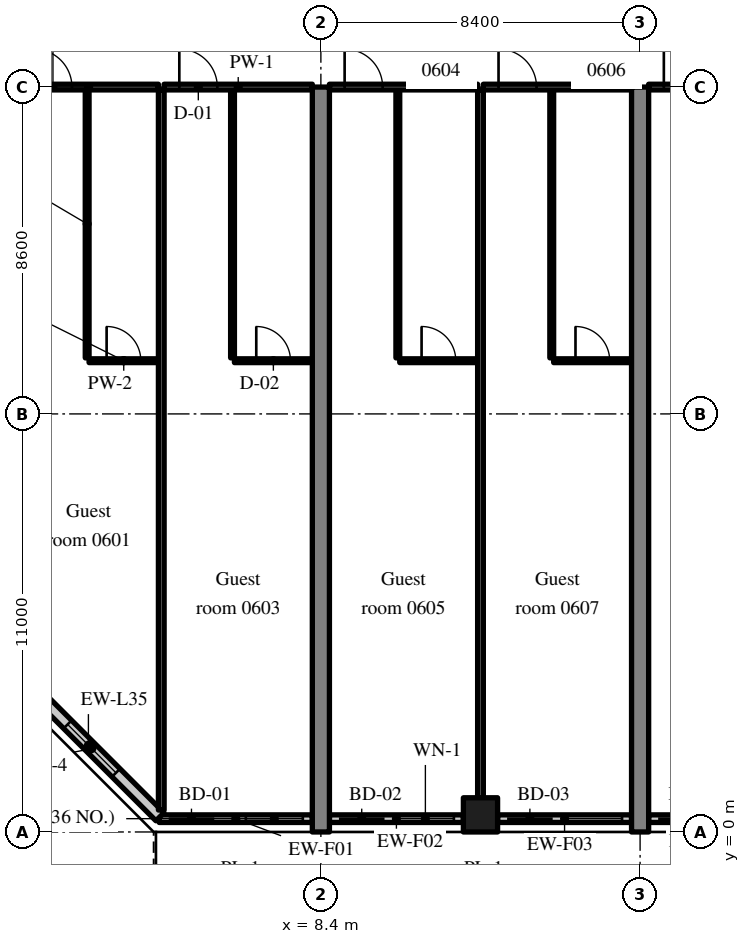
"""IFC4 building model, lengths in metres.
Left out: names, types, materials, properties, quantities, classifications, styles, units other than length and angle.
Written with IfcOpenShell. Run it as: python <this file> out.ifc"""

import sys

from ifc_helpers import new_model, si_unit, direction, frame, frame_2d, origin, origin_2d, place, context, subcontext, project, spatial, rectangle, extrude, source, transform, mapped, element, fill, save


model = new_model("IFC4")
c1 = context("Model", 3, precision=1e-05, world=origin(), true_north=direction((0.0, 1.0)))
c2 = subcontext(c1, "Body", "Model", "MODEL_VIEW")
j1 = project(units=[si_unit("LENGTHUNIT", "METRE"), si_unit("PLANEANGLEUNIT", "RADIAN")], contexts=[c1])
p1 = place(None, origin())
s1 = spatial("IfcSite", under=j1, at=p1, CompositionType="ELEMENT")
p2 = place(p1, origin())
s2 = spatial("IfcBuilding", under=s1, at=p2, CompositionType="ELEMENT")
p3 = place(p2, frame((0.0, 0.0, 31.6)))
s3 = spatial("IfcBuildingStorey", under=s2, at=p3, CompositionType="ELEMENT", Elevation=31.6)
m1 = source(origin(), c2, "Body", "SweptSolid", [
    extrude(rectangle(XDim=19.6, YDim=0.45, at=frame_2d((9.8, 0.0))), origin(), (0.0, 0.0, 1.0), 3.52),
])
for number, where, z_axis, x_axis in (
    (1, (8.4, 0.0, 0.0), (0.0, 0.0, 1.0), (0.0, 1.0, 0.0)),
    (2, (16.8, 0.0, 0.0), (0.0, 0.0, 1.0), (0.0, 1.0, 0.0)),
):
    element("IfcWall", number, at=place(p3, frame(where, z_axis=z_axis, x_axis=x_axis)), inside=s3, PredefinedType="SHEAR", context=c2, shape_type="MappedRepresentation", body=[
        mapped(m1, transform((0.0, 0.0, 0.0), scale=1.0)),
    ])
m2 = source(origin(), c2, "Body", "SweptSolid", [
    extrude(rectangle(XDim=0.9, YDim=0.9, at=origin_2d()), origin(), (0.0, 0.0, 1.0), 3.52),
])
p4 = place(p3, frame((12.6, 0.45, 0.0), z_axis=(0.0, 0.0, 1.0), x_axis=(1.0, 0.0, 0.0)))
e3 = element("IfcColumn", 3, at=p4, inside=s3, PredefinedType="COLUMN", context=c2, shape_type="MappedRepresentation", body=[
    mapped(m2, transform((0.0, 0.0, 0.0), scale=1.0)),
])
m3 = source(origin(), c2, "Body", "SweptSolid", [
    extrude(rectangle(XDim=4.03, YDim=0.2, at=frame_2d((2.015, 0.0))), origin(), (0.0, 0.0, 1.0), 2.77),
])
p5 = place(p3, frame((4.145, 0.35, 0.0), z_axis=(0.0, 0.0, 1.0), x_axis=(1.0, 0.0, 0.0)))
e4 = element("IfcWall", 4, at=p5, inside=s3, PredefinedType="SOLIDWALL", context=c2, shape_type="MappedRepresentation", body=[
    mapped(m3, transform((0.0, 0.0, 0.0), scale=1.0)),
])
m4 = source(origin(), c2, "Body", "SweptSolid", [
    extrude(rectangle(XDim=1.2, YDim=2.4, at=frame_2d((0.6, 1.2))), frame((0.0, 0.11, 0.0), z_axis=(0.0, -1.0, 0.0), x_axis=(1.0, 0.0, 0.0)), (0.0, 0.0, 1.0), 0.22),
])
p6 = place(p5, frame((0.25, 0.0, 0.0)))
e5 = element("IfcOpeningElement", 5, at=p6, cuts=e4, PredefinedType="OPENING", context=c2, shape_type="MappedRepresentation", body=[
    mapped(m4, transform((0.0, 0.0, 0.0), scale=1.0)),
])
m5 = source(origin(), c2, "Body", "SweptSolid", [
    extrude(rectangle(XDim=1.5, YDim=1.5, at=frame_2d((0.75, 0.75))), frame((0.0, 0.11, 0.0), z_axis=(0.0, -1.0, 0.0), x_axis=(1.0, 0.0, 0.0)), (0.0, 0.0, 1.0), 0.22),
])
p7 = place(p5, frame((2.28, 0.0, 0.9)))
e6 = element("IfcOpeningElement", 6, at=p7, cuts=e4, PredefinedType="OPENING", context=c2, shape_type="MappedRepresentation", body=[
    mapped(m5, transform((0.0, 0.0, 0.0), scale=1.0)),
])
m6 = source(origin(), c2, "Body", "SweptSolid", [
    extrude(rectangle(XDim=3.525, YDim=0.2, at=frame_2d((1.762, 0.0))), origin(), (0.0, 0.0, 1.0), 2.77),
])
p8 = place(p3, frame((8.625, 0.35, 0.0), z_axis=(0.0, 0.0, 1.0), x_axis=(1.0, 0.0, 0.0)))
e7 = element("IfcWall", 7, at=p8, inside=s3, PredefinedType="SOLIDWALL", context=c2, shape_type="MappedRepresentation", body=[
    mapped(m6, transform((0.0, 0.0, 0.0), scale=1.0)),
])
p9 = place(p8, frame((0.25, 0.0, 0.0)))
e8 = element("IfcOpeningElement", 8, at=p9, cuts=e7, PredefinedType="OPENING", context=c2, shape_type="MappedRepresentation", body=[
    mapped(m4, transform((0.0, 0.0, 0.0), scale=1.0)),
])
p10 = place(p8, frame((1.775, 0.0, 0.9)))
e9 = element("IfcOpeningElement", 9, at=p10, cuts=e7, PredefinedType="OPENING", context=c2, shape_type="MappedRepresentation", body=[
    mapped(m5, transform((0.0, 0.0, 0.0), scale=1.0)),
])
p11 = place(p3, frame((13.05, 0.35, 0.0), z_axis=(0.0, 0.0, 1.0), x_axis=(1.0, 0.0, 0.0)))
e10 = element("IfcWall", 10, at=p11, inside=s3, PredefinedType="SOLIDWALL", context=c2, shape_type="MappedRepresentation", body=[
    mapped(m6, transform((0.0, 0.0, 0.0), scale=1.0)),
])
p12 = place(p11, frame((0.25, 0.0, 0.0)))
e11 = element("IfcOpeningElement", 11, at=p12, cuts=e10, PredefinedType="OPENING", context=c2, shape_type="MappedRepresentation", body=[
    mapped(m4, transform((0.0, 0.0, 0.0), scale=1.0)),
])
p13 = place(p11, frame((1.775, 0.0, 0.9)))
e12 = element("IfcOpeningElement", 12, at=p13, cuts=e10, PredefinedType="OPENING", context=c2, shape_type="MappedRepresentation", body=[
    mapped(m5, transform((0.0, 0.0, 0.0), scale=1.0)),
])
m7 = source(origin(), c2, "Body", "SweptSolid", [
    extrude(rectangle(XDim=3.525, YDim=0.2, at=frame_2d((1.763, 0.0))), origin(), (0.0, 0.0, 1.0), 2.77),
])
p14 = place(p3, frame((17.025, 0.35, 0.0), z_axis=(0.0, 0.0, 1.0), x_axis=(1.0, 0.0, 0.0)))
e13 = element("IfcWall", 13, at=p14, inside=s3, PredefinedType="SOLIDWALL", context=c2, shape_type="MappedRepresentation", body=[
    mapped(m7, transform((0.0, 0.0, 0.0), scale=1.0)),
])
p15 = place(p14, frame((0.25, 0.0, 0.0)))
e14 = element("IfcOpeningElement", 14, at=p15, cuts=e13, PredefinedType="OPENING", context=c2, shape_type="MappedRepresentation", body=[
    mapped(m4, transform((0.0, 0.0, 0.0), scale=1.0)),
])
p16 = place(p14, frame((1.775, 0.0, 0.9)))
e15 = element("IfcOpeningElement", 15, at=p16, cuts=e13, PredefinedType="OPENING", context=c2, shape_type="MappedRepresentation", body=[
    mapped(m5, transform((0.0, 0.0, 0.0), scale=1.0)),
])
m8 = source(origin(), c2, "Body", "SweptSolid", [
    extrude(rectangle(XDim=5.326, YDim=0.3, at=frame_2d((2.663, 0.0))), origin(), (0.0, 0.0, 1.0), 3.52),
])
p17 = place(p3, frame((0.4, 4.166, 0.0), z_axis=(0.0, 0.0, 1.0), x_axis=(0.707106781187, -0.707106781187, 0.0)))
e16 = element("IfcWall", 16, at=p17, inside=s3, PredefinedType="SOLIDWALL", context=c2, shape_type="MappedRepresentation", body=[
    mapped(m8, transform((0.0, 0.0, 0.0), scale=1.0)),
])
m9 = source(origin(), c2, "Body", "SweptSolid", [
    extrude(rectangle(XDim=1.8, YDim=1.5, at=frame_2d((0.9, 0.75))), frame((0.0, 0.16, 0.0), z_axis=(0.0, -1.0, 0.0), x_axis=(1.0, 0.0, 0.0)), (0.0, 0.0, 1.0), 0.32),
])
p18 = place(p17, frame((1.889, 0.0, 0.9)))
e17 = element("IfcOpeningElement", 17, at=p18, cuts=e16, PredefinedType="OPENING", context=c2, shape_type="MappedRepresentation", body=[
    mapped(m9, transform((0.0, 0.0, 0.0), scale=1.0)),
])
m10 = source(origin(), c2, "Body", "SweptSolid", [
    extrude(rectangle(XDim=7.05, YDim=0.1, at=frame_2d((3.525, 0.0))), origin(), (0.0, 0.0, 1.0), 3.52),
])
p19 = place(p3, frame((2.25, 12.475, 0.0), z_axis=(0.0, 0.0, 1.0), x_axis=(0.0, 1.0, 0.0)))
e18 = element("IfcWall", 18, at=p19, inside=s3, PredefinedType="PARTITIONING", context=c2, shape_type="MappedRepresentation", body=[
    mapped(m10, transform((0.0, 0.0, 0.0), scale=1.0)),
])
m11 = source(origin(), c2, "Body", "SweptSolid", [
    extrude(rectangle(XDim=1.825, YDim=0.1, at=frame_2d((0.913, 0.0))), origin(), (0.0, 0.0, 1.0), 3.52),
])
p20 = place(p3, frame((2.3, 12.4, 0.0), z_axis=(0.0, 0.0, 1.0), x_axis=(1.0, 0.0, 0.0)))
e19 = element("IfcWall", 19, at=p20, inside=s3, PredefinedType="PARTITIONING", context=c2, shape_type="MappedRepresentation", body=[
    mapped(m11, transform((0.0, 0.0, 0.0), scale=1.0)),
])
m12 = source(origin(), c2, "Body", "SweptSolid", [
    extrude(rectangle(XDim=0.9, YDim=2.1, at=frame_2d((0.45, 1.05))), frame((0.0, 0.06, 0.0), z_axis=(0.0, -1.0, 0.0), x_axis=(1.0, 0.0, 0.0)), (0.0, 0.0, 1.0), 0.12),
])
p21 = place(p20, frame((0.462, 0.0, 0.0)))
e20 = element("IfcOpeningElement", 20, at=p21, cuts=e19, PredefinedType="OPENING", context=c2, shape_type="MappedRepresentation", body=[
    mapped(m12, transform((0.0, 0.0, 0.0), scale=1.0)),
])
m13 = source(origin(), c2, "Body", "SweptSolid", [
    extrude(rectangle(XDim=3.675, YDim=0.15, at=frame_2d((1.837, 0.0))), origin(), (0.0, 0.0, 1.0), 2.82),
])
p22 = place(p3, frame((0.45, 19.6, 0.0), z_axis=(0.0, 0.0, 1.0), x_axis=(1.0, 0.0, 0.0)))
e21 = element("IfcWall", 21, at=p22, inside=s3, PredefinedType="PARTITIONING", context=c2, shape_type="MappedRepresentation", body=[
    mapped(m13, transform((0.0, 0.0, 0.0), scale=1.0)),
])
m14 = source(origin(), c2, "Body", "SweptSolid", [
    extrude(rectangle(XDim=1.0, YDim=2.1, at=frame_2d((0.5, 1.05))), frame((0.0, 0.085, 0.0), z_axis=(0.0, -1.0, 0.0), x_axis=(1.0, 0.0, 0.0)), (0.0, 0.0, 1.0), 0.17),
])
p23 = place(p22, frame((0.4, 0.0, 0.0)))
e22 = element("IfcOpeningElement", 22, at=p23, cuts=e21, PredefinedType="OPENING", context=c2, shape_type="MappedRepresentation", body=[
    mapped(m14, transform((0.0, 0.0, 0.0), scale=1.0)),
])
p24 = place(p3, frame((6.075, 12.475, 0.0), z_axis=(0.0, 0.0, 1.0), x_axis=(0.0, 1.0, 0.0)))
e23 = element("IfcWall", 23, at=p24, inside=s3, PredefinedType="PARTITIONING", context=c2, shape_type="MappedRepresentation", body=[
    mapped(m10, transform((0.0, 0.0, 0.0), scale=1.0)),
])
m15 = source(origin(), c2, "Body", "SweptSolid", [
    extrude(rectangle(XDim=2.05, YDim=0.1, at=frame_2d((1.025, 0.0))), origin(), (0.0, 0.0, 1.0), 3.52),
])
p25 = place(p3, frame((6.125, 12.4, 0.0), z_axis=(0.0, 0.0, 1.0), x_axis=(1.0, 0.0, 0.0)))
e24 = element("IfcWall", 24, at=p25, inside=s3, PredefinedType="PARTITIONING", context=c2, shape_type="MappedRepresentation", body=[
    mapped(m15, transform((0.0, 0.0, 0.0), scale=1.0)),
])
p26 = place(p25, frame((0.575, 0.0, 0.0)))
e25 = element("IfcOpeningElement", 25, at=p26, cuts=e24, PredefinedType="OPENING", context=c2, shape_type="MappedRepresentation", body=[
    mapped(m12, transform((0.0, 0.0, 0.0), scale=1.0)),
])
m16 = source(origin(), c2, "Body", "SweptSolid", [
    extrude(rectangle(XDim=3.9, YDim=0.15, at=frame_2d((1.95, 0.0))), origin(), (0.0, 0.0, 1.0), 2.82),
])
p27 = place(p3, frame((4.275, 19.6, 0.0), z_axis=(0.0, 0.0, 1.0), x_axis=(1.0, 0.0, 0.0)))
e26 = element("IfcWall", 26, at=p27, inside=s3, PredefinedType="PARTITIONING", context=c2, shape_type="MappedRepresentation", body=[
    mapped(m16, transform((0.0, 0.0, 0.0), scale=1.0)),
])
p28 = place(p27, frame((0.4, 0.0, 0.0)))
e27 = element("IfcOpeningElement", 27, at=p28, cuts=e26, PredefinedType="OPENING", context=c2, shape_type="MappedRepresentation", body=[
    mapped(m14, transform((0.0, 0.0, 0.0), scale=1.0)),
])
m17 = source(origin(), c2, "Body", "SweptSolid", [
    extrude(rectangle(XDim=18.947, YDim=0.15, at=frame_2d((9.474, 0.0))), origin(), (0.0, 0.0, 1.0), 3.52),
])
p29 = place(p3, frame((4.2, 0.578, 0.0), z_axis=(0.0, 0.0, 1.0), x_axis=(0.0, 1.0, 0.0)))
e28 = element("IfcWall", 28, at=p29, inside=s3, PredefinedType="PARTITIONING", context=c2, shape_type="MappedRepresentation", body=[
    mapped(m17, transform((0.0, 0.0, 0.0), scale=1.0)),
])
p30 = place(p3, frame((10.425, 12.475, 0.0), z_axis=(0.0, 0.0, 1.0), x_axis=(0.0, 1.0, 0.0)))
e29 = element("IfcWall", 29, at=p30, inside=s3, PredefinedType="PARTITIONING", context=c2, shape_type="MappedRepresentation", body=[
    mapped(m10, transform((0.0, 0.0, 0.0), scale=1.0)),
])
m18 = source(origin(), c2, "Body", "SweptSolid", [
    extrude(rectangle(XDim=2.05, YDim=0.1, at=frame_2d((1.025, 0.0))), origin(), (0.0, 0.0, 1.0), 3.52),
])
p31 = place(p3, frame((10.475, 12.4, 0.0), z_axis=(0.0, 0.0, 1.0), x_axis=(1.0, 0.0, 0.0)))
e30 = element("IfcWall", 30, at=p31, inside=s3, PredefinedType="PARTITIONING", context=c2, shape_type="MappedRepresentation", body=[
    mapped(m18, transform((0.0, 0.0, 0.0), scale=1.0)),
])
p32 = place(p31, frame((0.575, 0.0, 0.0)))
e31 = element("IfcOpeningElement", 31, at=p32, cuts=e30, PredefinedType="OPENING", context=c2, shape_type="MappedRepresentation", body=[
    mapped(m12, transform((0.0, 0.0, 0.0), scale=1.0)),
])
m19 = source(origin(), c2, "Body", "SweptSolid", [
    extrude(rectangle(XDim=3.9, YDim=0.15, at=frame_2d((1.95, 0.0))), origin(), (0.0, 0.0, 1.0), 2.82),
])
p33 = place(p3, frame((8.625, 19.6, 0.0), z_axis=(0.0, 0.0, 1.0), x_axis=(1.0, 0.0, 0.0)))
e32 = element("IfcWall", 32, at=p33, inside=s3, PredefinedType="PARTITIONING", context=c2, shape_type="MappedRepresentation", body=[
    mapped(m19, transform((0.0, 0.0, 0.0), scale=1.0)),
])
p34 = place(p33, frame((0.4, 0.0, 0.0)))
e33 = element("IfcOpeningElement", 33, at=p34, cuts=e32, PredefinedType="OPENING", context=c2, shape_type="MappedRepresentation", body=[
    mapped(m14, transform((0.0, 0.0, 0.0), scale=1.0)),
])
p35 = place(p3, frame((14.475, 12.475, 0.0), z_axis=(0.0, 0.0, 1.0), x_axis=(0.0, 1.0, 0.0)))
e34 = element("IfcWall", 34, at=p35, inside=s3, PredefinedType="PARTITIONING", context=c2, shape_type="MappedRepresentation", body=[
    mapped(m10, transform((0.0, 0.0, 0.0), scale=1.0)),
])
p36 = place(p3, frame((14.525, 12.4, 0.0), z_axis=(0.0, 0.0, 1.0), x_axis=(1.0, 0.0, 0.0)))
e35 = element("IfcWall", 35, at=p36, inside=s3, PredefinedType="PARTITIONING", context=c2, shape_type="MappedRepresentation", body=[
    mapped(m15, transform((0.0, 0.0, 0.0), scale=1.0)),
])
p37 = place(p36, frame((0.575, 0.0, 0.0)))
e36 = element("IfcOpeningElement", 36, at=p37, cuts=e35, PredefinedType="OPENING", context=c2, shape_type="MappedRepresentation", body=[
    mapped(m12, transform((0.0, 0.0, 0.0), scale=1.0)),
])
p38 = place(p3, frame((12.675, 19.6, 0.0), z_axis=(0.0, 0.0, 1.0), x_axis=(1.0, 0.0, 0.0)))
e37 = element("IfcWall", 37, at=p38, inside=s3, PredefinedType="PARTITIONING", context=c2, shape_type="MappedRepresentation", body=[
    mapped(m19, transform((0.0, 0.0, 0.0), scale=1.0)),
])
p39 = place(p38, frame((0.4, 0.0, 0.0)))
e38 = element("IfcOpeningElement", 38, at=p39, cuts=e37, PredefinedType="OPENING", context=c2, shape_type="MappedRepresentation", body=[
    mapped(m14, transform((0.0, 0.0, 0.0), scale=1.0)),
])
m20 = source(origin(), c2, "Body", "SweptSolid", [
    extrude(rectangle(XDim=18.625, YDim=0.15, at=frame_2d((9.312, 0.0))), origin(), (0.0, 0.0, 1.0), 3.52),
])
p40 = place(p3, frame((12.6, 0.9, 0.0), z_axis=(0.0, 0.0, 1.0), x_axis=(0.0, 1.0, 0.0)))
e39 = element("IfcWall", 39, at=p40, inside=s3, PredefinedType="PARTITIONING", context=c2, shape_type="MappedRepresentation", body=[
    mapped(m20, transform((0.0, 0.0, 0.0), scale=1.0)),
])
p41 = place(p3, frame((17.025, 19.6, 0.0), z_axis=(0.0, 0.0, 1.0), x_axis=(1.0, 0.0, 0.0)))
e40 = element("IfcWall", 40, at=p41, inside=s3, PredefinedType="PARTITIONING", context=c2, shape_type="MappedRepresentation", body=[
    mapped(m16, transform((0.0, 0.0, 0.0), scale=1.0)),
])
p42 = place(p41, frame((0.4, 0.0, 0.0)))
e41 = element("IfcOpeningElement", 41, at=p42, cuts=e40, PredefinedType="OPENING", context=c2, shape_type="MappedRepresentation", body=[
    mapped(m14, transform((0.0, 0.0, 0.0), scale=1.0)),
])
m21 = source(origin(), c2, "Body", "SweptSolid", [
    extrude(rectangle(XDim=1.2, YDim=2.4, at=frame_2d((0.6, 1.2))), frame((0.0, 0.025, 0.0), z_axis=(0.0, -1.0, 0.0), x_axis=(1.0, 0.0, 0.0)), (0.0, 0.0, 1.0), 0.05),
])
p43 = place(p6, origin())
e42 = element("IfcDoor", 42, at=p43, inside=s3, OperationType="SLIDING_TO_LEFT", PredefinedType="DOOR", context=c2, shape_type="MappedRepresentation", body=[
    mapped(m21, transform((0.0, 0.0, 0.0), scale=1.0)),
])
fill(e5, e42)
m22 = source(origin(), c2, "Body", "SweptSolid", [
    extrude(rectangle(XDim=1.5, YDim=1.5, at=frame_2d((0.75, 0.75))), frame((0.0, 0.03, 0.0), z_axis=(0.0, -1.0, 0.0), x_axis=(1.0, 0.0, 0.0)), (0.0, 0.0, 1.0), 0.06),
])
p44 = place(p7, origin())
e43 = element("IfcWindow", 43, at=p44, inside=s3, PartitioningType="SINGLE_PANEL", PredefinedType="WINDOW", context=c2, shape_type="MappedRepresentation", body=[
    mapped(m22, transform((0.0, 0.0, 0.0), scale=1.0)),
])
fill(e6, e43)
p45 = place(p9, origin())
e44 = element("IfcDoor", 44, at=p45, inside=s3, OperationType="SLIDING_TO_RIGHT", PredefinedType="DOOR", context=c2, shape_type="MappedRepresentation", body=[
    mapped(m21, transform((0.0, 0.0, 0.0), scale=1.0)),
])
fill(e8, e44)
p46 = place(p10, origin())
e45 = element("IfcWindow", 45, at=p46, inside=s3, PartitioningType="SINGLE_PANEL", PredefinedType="WINDOW", context=c2, shape_type="MappedRepresentation", body=[
    mapped(m22, transform((0.0, 0.0, 0.0), scale=1.0)),
])
fill(e9, e45)
p47 = place(p12, origin())
e46 = element("IfcDoor", 46, at=p47, inside=s3, OperationType="SLIDING_TO_LEFT", PredefinedType="DOOR", context=c2, shape_type="MappedRepresentation", body=[
    mapped(m21, transform((0.0, 0.0, 0.0), scale=1.0)),
])
fill(e11, e46)
p48 = place(p13, origin())
e47 = element("IfcWindow", 47, at=p48, inside=s3, PartitioningType="SINGLE_PANEL", PredefinedType="WINDOW", context=c2, shape_type="MappedRepresentation", body=[
    mapped(m22, transform((0.0, 0.0, 0.0), scale=1.0)),
])
fill(e12, e47)
p49 = place(p15, origin())
e48 = element("IfcDoor", 48, at=p49, inside=s3, OperationType="SLIDING_TO_RIGHT", PredefinedType="DOOR", context=c2, shape_type="MappedRepresentation", body=[
    mapped(m21, transform((0.0, 0.0, 0.0), scale=1.0)),
])
fill(e14, e48)
m23 = source(origin(), c2, "Body", "SweptSolid", [
    extrude(rectangle(XDim=1.8, YDim=1.5, at=frame_2d((0.9, 0.75))), frame((0.0, 0.03, 0.0), z_axis=(0.0, -1.0, 0.0), x_axis=(1.0, 0.0, 0.0)), (0.0, 0.0, 1.0), 0.06),
])
p50 = place(p18, origin())
e49 = element("IfcWindow", 49, at=p50, inside=s3, PartitioningType="SINGLE_PANEL", PredefinedType="WINDOW", context=c2, shape_type="MappedRepresentation", body=[
    mapped(m23, transform((0.0, 0.0, 0.0), scale=1.0)),
])
fill(e17, e49)
m24 = source(origin(), c2, "Body", "SweptSolid", [
    extrude(rectangle(XDim=0.9, YDim=2.1, at=frame_2d((0.45, 1.05))), frame((0.0, 0.025, 0.0), z_axis=(0.0, -1.0, 0.0), x_axis=(1.0, 0.0, 0.0)), (0.0, 0.0, 1.0), 0.05),
])
p51 = place(p21, origin())
e50 = element("IfcDoor", 50, at=p51, inside=s3, OperationType="SINGLE_SWING_LEFT", PredefinedType="DOOR", context=c2, shape_type="MappedRepresentation", body=[
    mapped(m24, transform((0.0, 0.0, 0.0), scale=1.0)),
])
fill(e20, e50)
m25 = source(origin(), c2, "Body", "SweptSolid", [
    extrude(rectangle(XDim=1.0, YDim=2.1, at=frame_2d((0.5, 1.05))), frame((0.0, 0.025, 0.0), z_axis=(0.0, -1.0, 0.0), x_axis=(1.0, 0.0, 0.0)), (0.0, 0.0, 1.0), 0.05),
])
p52 = place(p23, origin())
e51 = element("IfcDoor", 51, at=p52, inside=s3, OperationType="SINGLE_SWING_LEFT", PredefinedType="DOOR", context=c2, shape_type="MappedRepresentation", body=[
    mapped(m25, transform((0.0, 0.0, 0.0), scale=1.0)),
])
fill(e22, e51)
p53 = place(p26, origin())
e52 = element("IfcDoor", 52, at=p53, inside=s3, OperationType="SINGLE_SWING_LEFT", PredefinedType="DOOR", context=c2, shape_type="MappedRepresentation", body=[
    mapped(m24, transform((0.0, 0.0, 0.0), scale=1.0)),
])
fill(e25, e52)
p54 = place(p28, origin())
e53 = element("IfcDoor", 53, at=p54, inside=s3, OperationType="SINGLE_SWING_LEFT", PredefinedType="DOOR", context=c2, shape_type="MappedRepresentation", body=[
    mapped(m25, transform((0.0, 0.0, 0.0), scale=1.0)),
])
fill(e27, e53)
p55 = place(p32, origin())
e54 = element("IfcDoor", 54, at=p55, inside=s3, OperationType="SINGLE_SWING_LEFT", PredefinedType="DOOR", context=c2, shape_type="MappedRepresentation", body=[
    mapped(m24, transform((0.0, 0.0, 0.0), scale=1.0)),
])
fill(e31, e54)
p56 = place(p34, origin())
e55 = element("IfcDoor", 55, at=p56, inside=s3, OperationType="SINGLE_SWING_LEFT", PredefinedType="DOOR", context=c2, shape_type="MappedRepresentation", body=[
    mapped(m25, transform((0.0, 0.0, 0.0), scale=1.0)),
])
fill(e33, e55)
p57 = place(p37, origin())
e56 = element("IfcDoor", 56, at=p57, inside=s3, OperationType="SINGLE_SWING_LEFT", PredefinedType="DOOR", context=c2, shape_type="MappedRepresentation", body=[
    mapped(m24, transform((0.0, 0.0, 0.0), scale=1.0)),
])
fill(e36, e56)
p58 = place(p39, origin())
e57 = element("IfcDoor", 57, at=p58, inside=s3, OperationType="SINGLE_SWING_LEFT", PredefinedType="DOOR", context=c2, shape_type="MappedRepresentation", body=[
    mapped(m25, transform((0.0, 0.0, 0.0), scale=1.0)),
])
fill(e38, e57)
p59 = place(p42, origin())
e58 = element("IfcDoor", 58, at=p59, inside=s3, OperationType="SINGLE_SWING_LEFT", PredefinedType="DOOR", context=c2, shape_type="MappedRepresentation", body=[
    mapped(m25, transform((0.0, 0.0, 0.0), scale=1.0)),
])
fill(e41, e58)
save(model, sys.argv[1])
